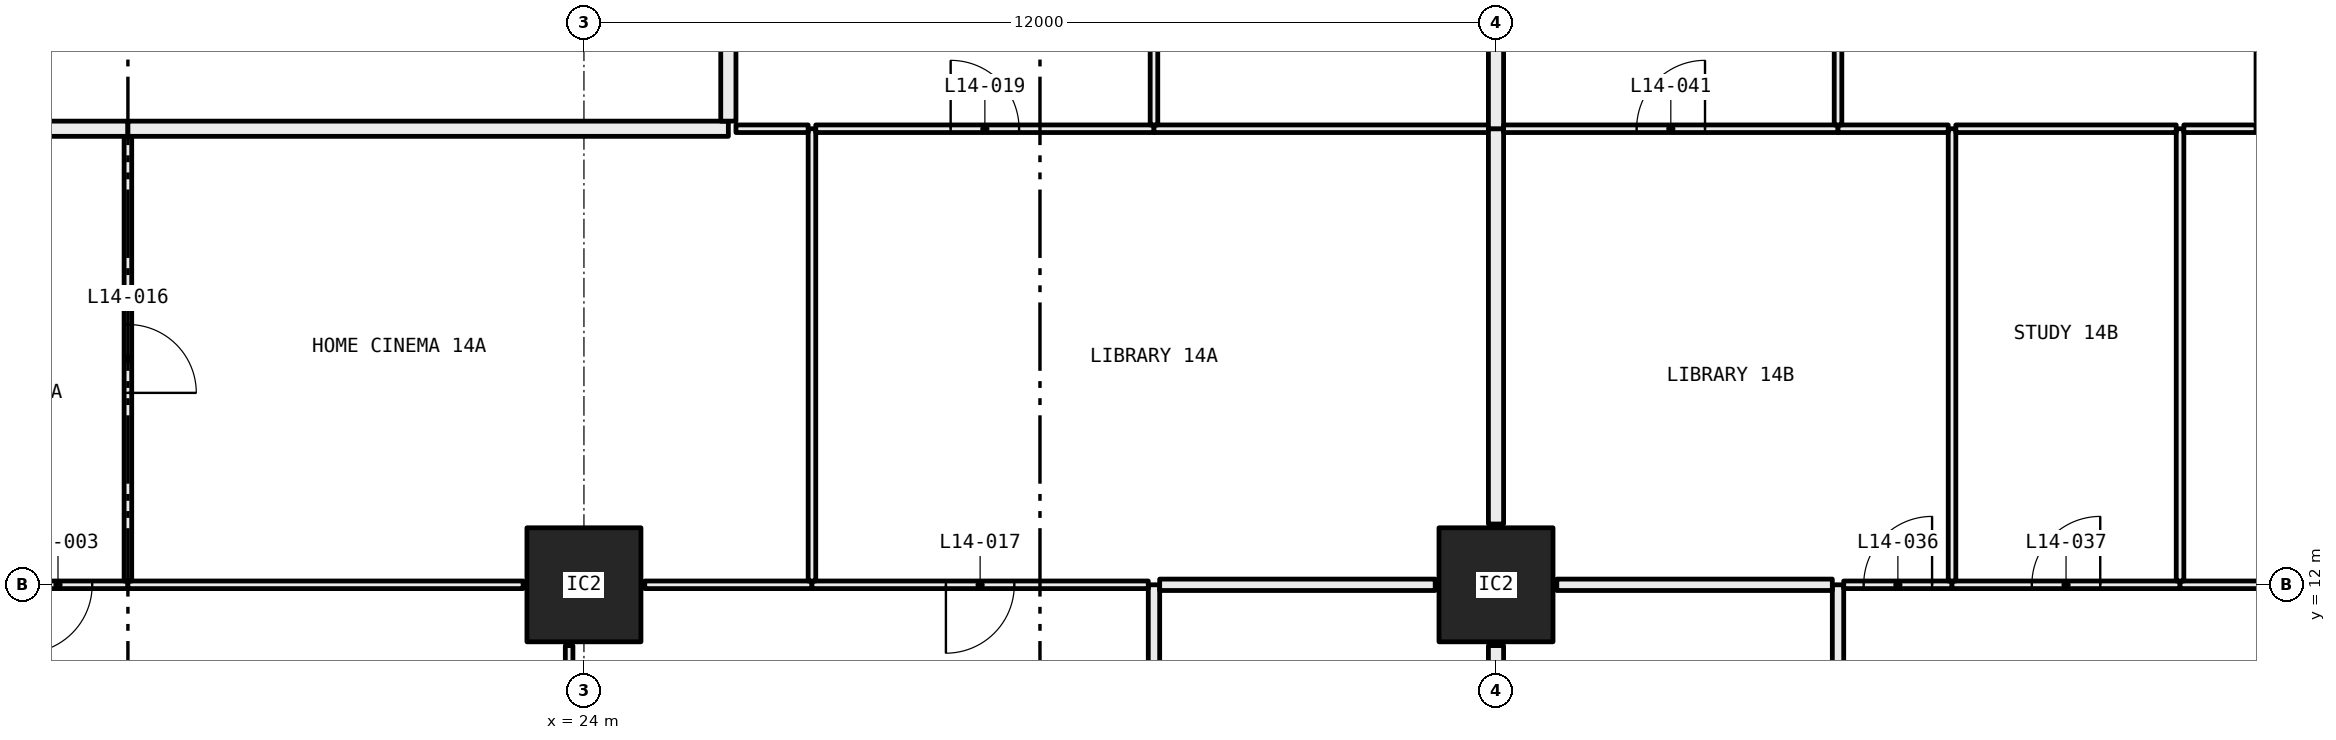
"""IFC4 building model, lengths in metres.
Left out: names, types, materials, properties, quantities, classifications, styles, units other than length and angle.
Written with IfcOpenShell. Run it as: python <this file> out.ifc"""

import sys

from ifc_helpers import new_model, si_unit, direction, frame, frame_2d, origin, origin_2d, place, context, subcontext, project, spatial, rectangle, hollow_rectangle, extrude, element, fill, save


model = new_model("IFC4")
c1 = context("Model", 3, precision=1e-05, world=origin(), true_north=direction((0.0, 1.0)))
c2 = subcontext(c1, "Body", "Model", "MODEL_VIEW")
j1 = project(units=[si_unit("LENGTHUNIT", "METRE"), si_unit("PLANEANGLEUNIT", "RADIAN")], contexts=[c1])
p1 = place(None, origin())
s1 = spatial("IfcSite", under=j1, at=p1, CompositionType="ELEMENT")
p2 = place(p1, origin())
s2 = spatial("IfcBuilding", under=s1, at=p2, CompositionType="ELEMENT")
p3 = place(p2, frame((0.0, 0.0, 61.05)))
s3 = spatial("IfcBuildingStorey", under=s2, at=p3, CompositionType="ELEMENT", Elevation=61.05)
for number, where, z_axis, x_axis in (
    (1, (24.0, 12.0, 0.0), (0.0, 0.0, 1.0), (1.0, 0.0, 0.0)),
    (2, (36.0, 12.0, 0.0), (0.0, 0.0, 1.0), (1.0, 0.0, 0.0)),
):
    element("IfcColumn", number, at=place(p3, frame(where, z_axis=z_axis, x_axis=x_axis)), inside=s3, PredefinedType="COLUMN", context=c2, shape_type="SweptSolid", body=[
        extrude(hollow_rectangle(XDim=1.5, YDim=1.5, WallThickness=0.065, at=origin_2d()), origin(), (0.0, 0.0, 1.0), 3.05),
    ])
p4 = place(p3, frame((23.805, 6.05, 0.0), z_axis=(0.0, 0.0, 1.0), x_axis=(0.0, 1.0, 0.0)))
e3 = element("IfcWall", 3, at=p4, inside=s3, PredefinedType="PARTITIONING", context=c2, shape_type="SweptSolid", body=[
    extrude(rectangle(XDim=5.15, YDim=0.1, at=frame_2d((2.575, 0.0))), origin(), (0.0, 0.0, 1.0), 3.05),
])
p5 = place(p4, frame((2.125, 0.0, 0.0)))
e4 = element("IfcOpeningElement", 4, at=p5, cuts=e3, PredefinedType="OPENING", context=c2, shape_type="SweptSolid", body=[
    extrude(rectangle(XDim=0.9, YDim=2.1, at=frame_2d((0.45, 1.05))), frame((0.0, 0.06, 0.0), z_axis=(0.0, -1.0, 0.0), x_axis=(1.0, 0.0, 0.0)), (0.0, 0.0, 1.0), 0.12),
])
p6 = place(p3, frame((18.0, 12.0, 0.0), z_axis=(0.0, 0.0, 1.0), x_axis=(-1.0, 0.0, 0.0)))
e5 = element("IfcWall", 5, at=p6, inside=s3, PredefinedType="PARTITIONING", context=c2, shape_type="SweptSolid", body=[
    extrude(rectangle(XDim=1.84, YDim=0.1, at=frame_2d((0.92, 0.0))), origin(), (0.0, 0.0, 1.0), 2.45),
])
p7 = place(p6, frame((0.47, 0.0, 0.0)))
e6 = element("IfcOpeningElement", 6, at=p7, cuts=e5, PredefinedType="OPENING", context=c2, shape_type="SweptSolid", body=[
    extrude(rectangle(XDim=0.9, YDim=2.1, at=frame_2d((0.45, 1.05))), frame((0.0, 0.06, 0.0), z_axis=(0.0, -1.0, 0.0), x_axis=(1.0, 0.0, 0.0)), (0.0, 0.0, 1.0), 0.12),
])
p8 = place(p3, frame((23.2, 12.0, 0.0), z_axis=(0.0, 0.0, 1.0), x_axis=(-1.0, 0.0, 0.0)))
e7 = element("IfcWall", 7, at=p8, inside=s3, PredefinedType="PARTITIONING", context=c2, shape_type="SweptSolid", body=[
    extrude(rectangle(XDim=5.2, YDim=0.1, at=frame_2d((2.6, 0.0))), origin(), (0.0, 0.0, 1.0), 2.45),
])
p9 = place(p3, frame((31.5, 9.0, 0.0), z_axis=(0.0, 0.0, 1.0), x_axis=(0.0, 1.0, 0.0)))
e8 = element("IfcWall", 8, at=p9, inside=s3, PredefinedType="PARTITIONING", context=c2, shape_type="SweptSolid", body=[
    extrude(rectangle(XDim=3.0, YDim=0.15, at=frame_2d((1.5, 0.0))), origin(), (0.0, 0.0, 1.0), 2.45),
])
p10 = place(p9, frame((1.05, 0.0, 0.0)))
e9 = element("IfcOpeningElement", 9, at=p10, cuts=e8, PredefinedType="OPENING", context=c2, shape_type="SweptSolid", body=[
    extrude(rectangle(XDim=0.9, YDim=2.1, at=frame_2d((0.45, 1.05))), frame((0.0, 0.085, 0.0), z_axis=(0.0, -1.0, 0.0), x_axis=(1.0, 0.0, 0.0)), (0.0, 0.0, 1.0), 0.17),
])
p11 = place(p3, frame((27.0, 12.0, 0.0), z_axis=(0.0, 0.0, 1.0), x_axis=(-1.0, 0.0, 0.0)))
e10 = element("IfcWall", 10, at=p11, inside=s3, PredefinedType="PARTITIONING", context=c2, shape_type="SweptSolid", body=[
    extrude(rectangle(XDim=2.2, YDim=0.1, at=frame_2d((1.1, 0.0))), origin(), (0.0, 0.0, 1.0), 2.45),
])
p12 = place(p3, frame((31.425, 12.0, 0.0), z_axis=(0.0, 0.0, 1.0), x_axis=(-1.0, 0.0, 0.0)))
e11 = element("IfcWall", 11, at=p12, inside=s3, PredefinedType="PARTITIONING", context=c2, shape_type="SweptSolid", body=[
    extrude(rectangle(XDim=4.425, YDim=0.1, at=frame_2d((2.212, 0.0))), origin(), (0.0, 0.0, 1.0), 2.45),
])
p13 = place(p12, frame((1.762, 0.0, 0.0)))
e12 = element("IfcOpeningElement", 12, at=p13, cuts=e11, PredefinedType="OPENING", context=c2, shape_type="SweptSolid", body=[
    extrude(rectangle(XDim=0.9, YDim=2.1, at=frame_2d((0.45, 1.05))), frame((0.0, 0.06, 0.0), z_axis=(0.0, -1.0, 0.0), x_axis=(1.0, 0.0, 0.0)), (0.0, 0.0, 1.0), 0.12),
])
p14 = place(p3, frame((35.2, 12.0, 0.0), z_axis=(0.0, 0.0, 1.0), x_axis=(-1.0, 0.0, 0.0)))
e13 = element("IfcWall", 13, at=p14, inside=s3, PredefinedType="PARTITIONING", context=c2, shape_type="SweptSolid", body=[
    extrude(rectangle(XDim=3.625, YDim=0.15, at=frame_2d((1.812, 0.0))), origin(), (0.0, 0.0, 1.0), 2.45),
])
p15 = place(p3, frame((36.0, 9.0, 0.0), z_axis=(0.0, 0.0, 1.0), x_axis=(0.0, 1.0, 0.0)))
e14 = element("IfcWall", 14, at=p15, inside=s3, PredefinedType="PARTITIONING", context=c2, shape_type="SweptSolid", body=[
    extrude(rectangle(XDim=2.2, YDim=0.2, at=frame_2d((1.1, 0.0))), origin(), (0.0, 0.0, 1.0), 2.45),
])
p16 = place(p3, frame((18.0, 12.05, 0.0), z_axis=(0.0, 0.0, 1.0), x_axis=(0.0, 1.0, 0.0)))
e15 = element("IfcWall", 15, at=p16, inside=s3, PredefinedType="PARTITIONING", context=c2, shape_type="SweptSolid", body=[
    extrude(rectangle(XDim=5.85, YDim=0.1, at=frame_2d((2.925, 0.0))), origin(), (0.0, 0.0, 1.0), 2.45),
])
p17 = place(p16, frame((2.475, 0.0, 0.0)))
e16 = element("IfcOpeningElement", 16, at=p17, cuts=e15, PredefinedType="OPENING", context=c2, shape_type="SweptSolid", body=[
    extrude(rectangle(XDim=0.9, YDim=2.1, at=frame_2d((0.45, 1.05))), frame((0.0, 0.06, 0.0), z_axis=(0.0, -1.0, 0.0), x_axis=(1.0, 0.0, 0.0)), (0.0, 0.0, 1.0), 0.12),
])
p18 = place(p3, frame((18.0, 18.0, 0.0), z_axis=(0.0, 0.0, 1.0), x_axis=(-1.0, 0.0, 0.0)))
e17 = element("IfcWall", 17, at=p18, inside=s3, PredefinedType="PARTITIONING", context=c2, shape_type="SweptSolid", body=[
    extrude(rectangle(XDim=4.5, YDim=0.2, at=frame_2d((2.25, 0.0))), origin(), (0.0, 0.0, 1.0), 3.05),
])
p19 = place(p18, frame((1.75, 0.0, 0.0)))
e18 = element("IfcOpeningElement", 18, at=p19, cuts=e17, PredefinedType="OPENING", context=c2, shape_type="SweptSolid", body=[
    extrude(rectangle(XDim=1.0, YDim=2.1, at=frame_2d((0.5, 1.05))), frame((0.0, 0.11, 0.0), z_axis=(0.0, -1.0, 0.0), x_axis=(1.0, 0.0, 0.0)), (0.0, 0.0, 1.0), 0.22),
])
p20 = place(p3, frame((27.0, 12.05, 0.0), z_axis=(0.0, 0.0, 1.0), x_axis=(0.0, 1.0, 0.0)))
e19 = element("IfcWall", 19, at=p20, inside=s3, PredefinedType="PARTITIONING", context=c2, shape_type="SweptSolid", body=[
    extrude(rectangle(XDim=5.95, YDim=0.1, at=frame_2d((2.975, 0.0))), origin(), (0.0, 0.0, 1.0), 2.45),
])
p21 = place(p3, frame((26.95, 18.0, 0.0), z_axis=(0.0, 0.0, 1.0), x_axis=(-1.0, 0.0, 0.0)))
e20 = element("IfcWall", 20, at=p21, inside=s3, PredefinedType="PARTITIONING", context=c2, shape_type="SweptSolid", body=[
    extrude(rectangle(XDim=0.95, YDim=0.1, at=frame_2d((0.475, 0.0))), origin(), (0.0, 0.0, 1.0), 3.05),
])
p22 = place(p3, frame((25.9, 18.0, 0.0), z_axis=(0.0, 0.0, 1.0), x_axis=(-1.0, 0.0, 0.0)))
e21 = element("IfcWall", 21, at=p22, inside=s3, PredefinedType="PARTITIONING", context=c2, shape_type="SweptSolid", body=[
    extrude(rectangle(XDim=7.9, YDim=0.2, at=frame_2d((3.95, 0.0))), origin(), (0.0, 0.0, 1.0), 3.05),
])
p23 = place(p3, frame((31.5, 18.0, 0.0), z_axis=(0.0, 0.0, 1.0), x_axis=(-1.0, 0.0, 0.0)))
e22 = element("IfcWall", 22, at=p23, inside=s3, PredefinedType="PARTITIONING", context=c2, shape_type="SweptSolid", body=[
    extrude(rectangle(XDim=4.45, YDim=0.1, at=frame_2d((2.225, 0.0))), origin(), (0.0, 0.0, 1.0), 3.05),
])
p24 = place(p23, frame((1.775, 0.0, 0.0)))
e23 = element("IfcOpeningElement", 23, at=p24, cuts=e22, PredefinedType="OPENING", context=c2, shape_type="SweptSolid", body=[
    extrude(rectangle(XDim=0.9, YDim=2.1, at=frame_2d((0.45, 1.05))), frame((0.0, 0.06, 0.0), z_axis=(0.0, -1.0, 0.0), x_axis=(1.0, 0.0, 0.0)), (0.0, 0.0, 1.0), 0.12),
])
p25 = place(p3, frame((35.9, 18.0, 0.0), z_axis=(0.0, 0.0, 1.0), x_axis=(-1.0, 0.0, 0.0)))
e24 = element("IfcWall", 24, at=p25, inside=s3, PredefinedType="PARTITIONING", context=c2, shape_type="SweptSolid", body=[
    extrude(rectangle(XDim=4.4, YDim=0.1, at=frame_2d((2.2, 0.0))), origin(), (0.0, 0.0, 1.0), 3.05),
])
p26 = place(p3, frame((36.0, 12.8, 0.0), z_axis=(0.0, 0.0, 1.0), x_axis=(0.0, 1.0, 0.0)))
e25 = element("IfcWall", 25, at=p26, inside=s3, PredefinedType="PARTITIONING", context=c2, shape_type="SweptSolid", body=[
    extrude(rectangle(XDim=5.2, YDim=0.2, at=frame_2d((2.6, 0.0))), origin(), (0.0, 0.0, 1.0), 2.45),
])
p27 = place(p3, frame((31.5, 18.05, 0.0), z_axis=(0.0, 0.0, 1.0), x_axis=(0.0, 1.0, 0.0)))
e26 = element("IfcWall", 26, at=p27, inside=s3, PredefinedType="PARTITIONING", context=c2, shape_type="SweptSolid", body=[
    extrude(rectangle(XDim=6.25, YDim=0.1, at=frame_2d((3.125, 0.0))), origin(), (0.0, 0.0, 1.0), 2.45),
])
p28 = place(p27, frame((2.675, 0.0, 0.0)))
e27 = element("IfcOpeningElement", 27, at=p28, cuts=e26, PredefinedType="OPENING", context=c2, shape_type="SweptSolid", body=[
    extrude(rectangle(XDim=0.9, YDim=2.1, at=frame_2d((0.45, 1.05))), frame((0.0, 0.06, 0.0), z_axis=(0.0, -1.0, 0.0), x_axis=(1.0, 0.0, 0.0)), (0.0, 0.0, 1.0), 0.12),
])
p29 = place(p3, frame((25.9, 23.9, 0.0), z_axis=(0.0, 0.0, 1.0), x_axis=(0.0, -1.0, 0.0)))
e28 = element("IfcWall", 28, at=p29, inside=s3, PredefinedType="PARTITIONING", context=c2, shape_type="SweptSolid", body=[
    extrude(rectangle(XDim=5.8, YDim=0.2, at=frame_2d((2.9, 0.0))), origin(), (0.0, 0.0, 1.0), 3.05),
])
p30 = place(p3, frame((36.0, 18.0, 0.0), z_axis=(0.0, 0.0, 1.0), x_axis=(0.0, 1.0, 0.0)))
e29 = element("IfcWall", 29, at=p30, inside=s3, PredefinedType="PARTITIONING", context=c2, shape_type="SweptSolid", body=[
    extrude(rectangle(XDim=5.2, YDim=0.2, at=frame_2d((2.6, 0.0))), origin(), (0.0, 0.0, 1.0), 2.45),
])
p31 = place(p3, frame((40.5, 9.075, 0.0), z_axis=(0.0, 0.0, 1.0), x_axis=(0.0, 1.0, 0.0)))
e30 = element("IfcWall", 30, at=p31, inside=s3, PredefinedType="PARTITIONING", context=c2, shape_type="SweptSolid", body=[
    extrude(rectangle(XDim=2.925, YDim=0.15, at=frame_2d((1.462, 0.0))), origin(), (0.0, 0.0, 1.0), 2.45),
])
p32 = place(p31, frame((1.012, 0.0, 0.0)))
e31 = element("IfcOpeningElement", 31, at=p32, cuts=e30, PredefinedType="OPENING", context=c2, shape_type="SweptSolid", body=[
    extrude(rectangle(XDim=0.9, YDim=2.1, at=frame_2d((0.45, 1.05))), frame((0.0, 0.085, 0.0), z_axis=(0.0, -1.0, 0.0), x_axis=(1.0, 0.0, 0.0)), (0.0, 0.0, 1.0), 0.17),
])
p33 = place(p3, frame((40.425, 12.0, 0.0), z_axis=(0.0, 0.0, 1.0), x_axis=(-1.0, 0.0, 0.0)))
e32 = element("IfcWall", 32, at=p33, inside=s3, PredefinedType="PARTITIONING", context=c2, shape_type="SweptSolid", body=[
    extrude(rectangle(XDim=3.625, YDim=0.15, at=frame_2d((1.812, 0.0))), origin(), (0.0, 0.0, 1.0), 2.45),
])
p34 = place(p3, frame((42.0, 12.0, 0.0), z_axis=(0.0, 0.0, 1.0), x_axis=(-1.0, 0.0, 0.0)))
e33 = element("IfcWall", 33, at=p34, inside=s3, PredefinedType="PARTITIONING", context=c2, shape_type="SweptSolid", body=[
    extrude(rectangle(XDim=1.425, YDim=0.1, at=frame_2d((0.712, 0.0))), origin(), (0.0, 0.0, 1.0), 2.45),
])
p35 = place(p34, frame((0.262, 0.0, 0.0)))
e34 = element("IfcOpeningElement", 34, at=p35, cuts=e33, PredefinedType="OPENING", context=c2, shape_type="SweptSolid", body=[
    extrude(rectangle(XDim=0.9, YDim=2.1, at=frame_2d((0.45, 1.05))), frame((0.0, 0.06, 0.0), z_axis=(0.0, -1.0, 0.0), x_axis=(1.0, 0.0, 0.0)), (0.0, 0.0, 1.0), 0.12),
])
p36 = place(p3, frame((45.0, 12.0, 0.0), z_axis=(0.0, 0.0, 1.0), x_axis=(-1.0, 0.0, 0.0)))
e35 = element("IfcWall", 35, at=p36, inside=s3, PredefinedType="PARTITIONING", context=c2, shape_type="SweptSolid", body=[
    extrude(rectangle(XDim=3.0, YDim=0.1, at=frame_2d((1.5, 0.0))), origin(), (0.0, 0.0, 1.0), 2.45),
])
p37 = place(p36, frame((1.05, 0.0, 0.0)))
e36 = element("IfcOpeningElement", 36, at=p37, cuts=e35, PredefinedType="OPENING", context=c2, shape_type="SweptSolid", body=[
    extrude(rectangle(XDim=0.9, YDim=2.1, at=frame_2d((0.45, 1.05))), frame((0.0, 0.06, 0.0), z_axis=(0.0, -1.0, 0.0), x_axis=(1.0, 0.0, 0.0)), (0.0, 0.0, 1.0), 0.12),
])
p38 = place(p3, frame((47.2, 12.0, 0.0), z_axis=(0.0, 0.0, 1.0), x_axis=(-1.0, 0.0, 0.0)))
e37 = element("IfcWall", 37, at=p38, inside=s3, PredefinedType="PARTITIONING", context=c2, shape_type="SweptSolid", body=[
    extrude(rectangle(XDim=2.2, YDim=0.1, at=frame_2d((1.1, 0.0))), origin(), (0.0, 0.0, 1.0), 2.45),
])
p39 = place(p3, frame((42.0, 12.05, 0.0), z_axis=(0.0, 0.0, 1.0), x_axis=(0.0, 1.0, 0.0)))
e38 = element("IfcWall", 38, at=p39, inside=s3, PredefinedType="PARTITIONING", context=c2, shape_type="SweptSolid", body=[
    extrude(rectangle(XDim=5.95, YDim=0.1, at=frame_2d((2.975, 0.0))), origin(), (0.0, 0.0, 1.0), 2.45),
])
p40 = place(p3, frame((40.5, 18.0, 0.0), z_axis=(0.0, 0.0, 1.0), x_axis=(-1.0, 0.0, 0.0)))
e39 = element("IfcWall", 39, at=p40, inside=s3, PredefinedType="PARTITIONING", context=c2, shape_type="SweptSolid", body=[
    extrude(rectangle(XDim=4.4, YDim=0.1, at=frame_2d((2.2, 0.0))), origin(), (0.0, 0.0, 1.0), 3.05),
])
p41 = place(p40, frame((1.75, 0.0, 0.0)))
e40 = element("IfcOpeningElement", 40, at=p41, cuts=e39, PredefinedType="OPENING", context=c2, shape_type="SweptSolid", body=[
    extrude(rectangle(XDim=0.9, YDim=2.1, at=frame_2d((0.45, 1.05))), frame((0.0, 0.06, 0.0), z_axis=(0.0, -1.0, 0.0), x_axis=(1.0, 0.0, 0.0)), (0.0, 0.0, 1.0), 0.12),
])
p42 = place(p3, frame((41.95, 18.0, 0.0), z_axis=(0.0, 0.0, 1.0), x_axis=(-1.0, 0.0, 0.0)))
e41 = element("IfcWall", 41, at=p42, inside=s3, PredefinedType="PARTITIONING", context=c2, shape_type="SweptSolid", body=[
    extrude(rectangle(XDim=1.45, YDim=0.1, at=frame_2d((0.725, 0.0))), origin(), (0.0, 0.0, 1.0), 3.05),
])
p43 = place(p3, frame((45.0, 12.05, 0.0), z_axis=(0.0, 0.0, 1.0), x_axis=(0.0, 1.0, 0.0)))
e42 = element("IfcWall", 42, at=p43, inside=s3, PredefinedType="PARTITIONING", context=c2, shape_type="SweptSolid", body=[
    extrude(rectangle(XDim=5.95, YDim=0.1, at=frame_2d((2.975, 0.0))), origin(), (0.0, 0.0, 1.0), 2.45),
])
p44 = place(p3, frame((44.95, 18.0, 0.0), z_axis=(0.0, 0.0, 1.0), x_axis=(-1.0, 0.0, 0.0)))
e43 = element("IfcWall", 43, at=p44, inside=s3, PredefinedType="PARTITIONING", context=c2, shape_type="SweptSolid", body=[
    extrude(rectangle(XDim=2.9, YDim=0.1, at=frame_2d((1.45, 0.0))), origin(), (0.0, 0.0, 1.0), 3.05),
])
p45 = place(p3, frame((46.0, 18.0, 0.0), z_axis=(0.0, 0.0, 1.0), x_axis=(-1.0, 0.0, 0.0)))
e44 = element("IfcWall", 44, at=p45, inside=s3, PredefinedType="PARTITIONING", context=c2, shape_type="SweptSolid", body=[
    extrude(rectangle(XDim=0.95, YDim=0.1, at=frame_2d((0.475, 0.0))), origin(), (0.0, 0.0, 1.0), 3.05),
])
p46 = place(p3, frame((40.5, 18.05, 0.0), z_axis=(0.0, 0.0, 1.0), x_axis=(0.0, 1.0, 0.0)))
e45 = element("IfcWall", 45, at=p46, inside=s3, PredefinedType="PARTITIONING", context=c2, shape_type="SweptSolid", body=[
    extrude(rectangle(XDim=6.175, YDim=0.1, at=frame_2d((3.087, 0.0))), origin(), (0.0, 0.0, 1.0), 2.45),
])
p47 = place(p46, frame((2.637, 0.0, 0.0)))
e46 = element("IfcOpeningElement", 46, at=p47, cuts=e45, PredefinedType="OPENING", context=c2, shape_type="SweptSolid", body=[
    extrude(rectangle(XDim=0.9, YDim=2.1, at=frame_2d((0.45, 1.05))), frame((0.0, 0.06, 0.0), z_axis=(0.0, -1.0, 0.0), x_axis=(1.0, 0.0, 0.0)), (0.0, 0.0, 1.0), 0.12),
])
p48 = place(p7, origin())
e47 = element("IfcDoor", 47, at=p48, inside=s3, OperationType="SINGLE_SWING_LEFT", PredefinedType="DOOR", context=c2, shape_type="SweptSolid", body=[
    extrude(rectangle(XDim=0.9, YDim=2.1, at=frame_2d((0.45, 1.05))), frame((0.0, 0.025, 0.0), z_axis=(0.0, -1.0, 0.0), x_axis=(1.0, 0.0, 0.0)), (0.0, 0.0, 1.0), 0.05),
])
fill(e6, e47)
p49 = place(p17, frame((0.9, 0.0, 0.0), x_axis=(-1.0, 0.0, 0.0)))
e48 = element("IfcDoor", 48, at=p49, inside=s3, OperationType="SINGLE_SWING_LEFT", PredefinedType="DOOR", context=c2, shape_type="SweptSolid", body=[
    extrude(rectangle(XDim=0.9, YDim=2.1, at=frame_2d((0.45, 1.05))), frame((0.0, 0.025, 0.0), z_axis=(0.0, -1.0, 0.0), x_axis=(1.0, 0.0, 0.0)), (0.0, 0.0, 1.0), 0.05),
])
fill(e16, e48)
p50 = place(p13, origin())
e49 = element("IfcDoor", 49, at=p50, inside=s3, OperationType="SINGLE_SWING_LEFT", PredefinedType="DOOR", context=c2, shape_type="SweptSolid", body=[
    extrude(rectangle(XDim=0.9, YDim=2.1, at=frame_2d((0.45, 1.05))), frame((0.0, 0.025, 0.0), z_axis=(0.0, -1.0, 0.0), x_axis=(1.0, 0.0, 0.0)), (0.0, 0.0, 1.0), 0.05),
])
fill(e12, e49)
p51 = place(p24, frame((0.9, 0.0, 0.0), x_axis=(-1.0, 0.0, 0.0)))
e50 = element("IfcDoor", 50, at=p51, inside=s3, OperationType="SINGLE_SWING_RIGHT", PredefinedType="DOOR", context=c2, shape_type="SweptSolid", body=[
    extrude(rectangle(XDim=0.9, YDim=2.1, at=frame_2d((0.45, 1.05))), frame((0.0, 0.025, 0.0), z_axis=(0.0, -1.0, 0.0), x_axis=(1.0, 0.0, 0.0)), (0.0, 0.0, 1.0), 0.05),
])
fill(e23, e50)
p52 = place(p35, frame((0.9, 0.0, 0.0), x_axis=(-1.0, 0.0, 0.0)))
e51 = element("IfcDoor", 51, at=p52, inside=s3, OperationType="SINGLE_SWING_LEFT", PredefinedType="DOOR", context=c2, shape_type="SweptSolid", body=[
    extrude(rectangle(XDim=0.9, YDim=2.1, at=frame_2d((0.45, 1.05))), frame((0.0, 0.025, 0.0), z_axis=(0.0, -1.0, 0.0), x_axis=(1.0, 0.0, 0.0)), (0.0, 0.0, 1.0), 0.05),
])
fill(e34, e51)
p53 = place(p37, frame((0.9, 0.0, 0.0), x_axis=(-1.0, 0.0, 0.0)))
e52 = element("IfcDoor", 52, at=p53, inside=s3, OperationType="SINGLE_SWING_LEFT", PredefinedType="DOOR", context=c2, shape_type="SweptSolid", body=[
    extrude(rectangle(XDim=0.9, YDim=2.1, at=frame_2d((0.45, 1.05))), frame((0.0, 0.025, 0.0), z_axis=(0.0, -1.0, 0.0), x_axis=(1.0, 0.0, 0.0)), (0.0, 0.0, 1.0), 0.05),
])
fill(e36, e52)
p54 = place(p41, frame((0.9, 0.0, 0.0), x_axis=(-1.0, 0.0, 0.0)))
e53 = element("IfcDoor", 53, at=p54, inside=s3, OperationType="SINGLE_SWING_LEFT", PredefinedType="DOOR", context=c2, shape_type="SweptSolid", body=[
    extrude(rectangle(XDim=0.9, YDim=2.1, at=frame_2d((0.45, 1.05))), frame((0.0, 0.025, 0.0), z_axis=(0.0, -1.0, 0.0), x_axis=(1.0, 0.0, 0.0)), (0.0, 0.0, 1.0), 0.05),
])
fill(e40, e53)
save(model, sys.argv[1])
